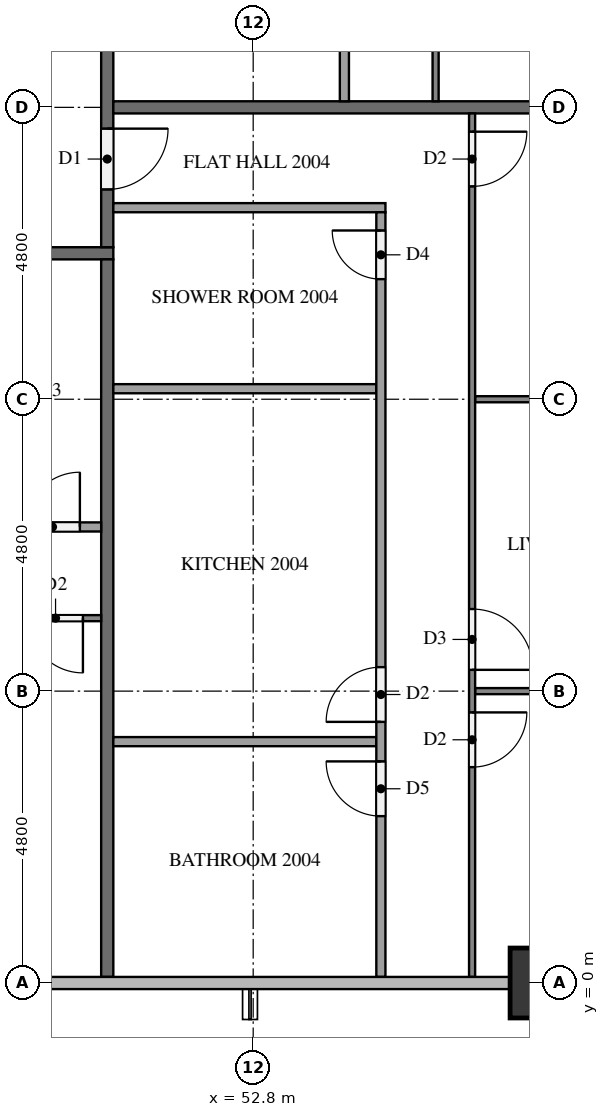
"""IFC4 building model, lengths in metres.
Left out: names, types, materials, properties, quantities, classifications, styles, units other than length and angle.
Written with IfcOpenShell. Run it as: python <this file> out.ifc"""

import sys

from ifc_helpers import new_model, si_unit, direction, frame, frame_2d, origin, origin_2d, place, context, subcontext, project, spatial, rectangle, extrude, element, fill, save


model = new_model("IFC4")
c1 = context("Model", 3, precision=1e-05, world=origin(), true_north=direction((0.0, 1.0)))
c2 = subcontext(c1, "Body", "Model", "MODEL_VIEW")
j1 = project(units=[si_unit("LENGTHUNIT", "METRE"), si_unit("PLANEANGLEUNIT", "RADIAN")], contexts=[c1])
p1 = place(None, origin())
s1 = spatial("IfcSite", under=j1, at=p1, CompositionType="ELEMENT")
p2 = place(p1, origin())
s2 = spatial("IfcBuilding", under=s1, at=p2, CompositionType="ELEMENT")
p3 = place(p2, frame((0.0, 0.0, 80.3)))
s3 = spatial("IfcBuildingStorey", under=s2, at=p3, CompositionType="ELEMENT", Elevation=80.3)
p4 = place(p3, frame((57.6, 0.0, 0.0), z_axis=(0.0, 0.0, 1.0), x_axis=(1.0, 0.0, 0.0)))
e1 = element("IfcColumn", 1, at=p4, inside=s3, PredefinedType="COLUMN", context=c2, shape_type="SweptSolid", body=[
    extrude(rectangle(XDim=1.15, YDim=1.15, at=origin_2d()), origin(), (0.0, 0.0, 1.0), 3.1),
])
p5 = place(p3, frame((50.5, 12.0, 0.0), z_axis=(0.0, 0.0, 1.0), x_axis=(-1.0, 0.0, 0.0)))
e2 = element("IfcWall", 2, at=p5, inside=s3, PredefinedType="PARTITIONING", context=c2, shape_type="SweptSolid", body=[
    extrude(rectangle(XDim=38.6, YDim=0.2, at=frame_2d((19.3, 0.0))), origin(), (0.0, 0.0, 1.0), 3.1),
])
p6 = place(p5, frame((31.65, 0.0, 0.0)))
e3 = element("IfcOpeningElement", 3, at=p6, cuts=e2, PredefinedType="OPENING", context=c2, shape_type="SweptSolid", body=[
    extrude(rectangle(XDim=1.0, YDim=2.1, at=frame_2d((0.5, 1.05))), frame((0.0, 0.11, 0.0), z_axis=(0.0, -1.0, 0.0), x_axis=(1.0, 0.0, 0.0)), (0.0, 0.0, 1.0), 0.22),
])
p7 = place(p5, frame((14.85, 0.0, 0.0)))
e4 = element("IfcOpeningElement", 4, at=p7, cuts=e2, PredefinedType="OPENING", context=c2, shape_type="SweptSolid", body=[
    extrude(rectangle(XDim=1.0, YDim=2.1, at=frame_2d((0.5, 1.05))), frame((0.0, 0.11, 0.0), z_axis=(0.0, -1.0, 0.0), x_axis=(1.0, 0.0, 0.0)), (0.0, 0.0, 1.0), 0.22),
])
p8 = place(p5, frame((13.15, 0.0, 0.0)))
e5 = element("IfcOpeningElement", 5, at=p8, cuts=e2, PredefinedType="OPENING", context=c2, shape_type="SweptSolid", body=[
    extrude(rectangle(XDim=1.0, YDim=2.1, at=frame_2d((0.5, 1.05))), frame((0.0, 0.11, 0.0), z_axis=(0.0, -1.0, 0.0), x_axis=(1.0, 0.0, 0.0)), (0.0, 0.0, 1.0), 0.22),
])
p9 = place(p3, frame((50.4, 40.7, 0.0), z_axis=(0.0, 0.0, 1.0), x_axis=(0.0, -1.0, 0.0)))
e6 = element("IfcWall", 6, at=p9, inside=s3, PredefinedType="PARTITIONING", context=c2, shape_type="SweptSolid", body=[
    extrude(rectangle(XDim=28.6, YDim=0.2, at=frame_2d((14.3, 0.0))), origin(), (0.0, 0.0, 1.0), 3.1),
])
p10 = place(p9, frame((26.65, 0.0, 0.0)))
e7 = element("IfcOpeningElement", 7, at=p10, cuts=e6, PredefinedType="OPENING", context=c2, shape_type="SweptSolid", body=[
    extrude(rectangle(XDim=1.0, YDim=2.1, at=frame_2d((0.5, 1.05))), frame((0.0, 0.11, 0.0), z_axis=(0.0, -1.0, 0.0), x_axis=(1.0, 0.0, 0.0)), (0.0, 0.0, 1.0), 0.22),
])
p11 = place(p9, frame((9.85, 0.0, 0.0)))
e8 = element("IfcOpeningElement", 8, at=p11, cuts=e6, PredefinedType="OPENING", context=c2, shape_type="SweptSolid", body=[
    extrude(rectangle(XDim=1.0, YDim=2.1, at=frame_2d((0.5, 1.05))), frame((0.0, 0.11, 0.0), z_axis=(0.0, -1.0, 0.0), x_axis=(1.0, 0.0, 0.0)), (0.0, 0.0, 1.0), 0.22),
])
p12 = place(p9, frame((2.65, 0.0, 0.0)))
e9 = element("IfcOpeningElement", 9, at=p12, cuts=e6, PredefinedType="OPENING", context=c2, shape_type="SweptSolid", body=[
    extrude(rectangle(XDim=1.0, YDim=2.1, at=frame_2d((0.5, 1.05))), frame((0.0, 0.11, 0.0), z_axis=(0.0, -1.0, 0.0), x_axis=(1.0, 0.0, 0.0)), (0.0, 0.0, 1.0), 0.22),
])
p13 = place(p9, frame((0.95, 0.0, 0.0)))
e10 = element("IfcOpeningElement", 10, at=p13, cuts=e6, PredefinedType="OPENING", context=c2, shape_type="SweptSolid", body=[
    extrude(rectangle(XDim=1.0, YDim=2.1, at=frame_2d((0.5, 1.05))), frame((0.0, 0.11, 0.0), z_axis=(0.0, -1.0, 0.0), x_axis=(1.0, 0.0, 0.0)), (0.0, 0.0, 1.0), 0.22),
])
p14 = place(p3, frame((50.4, 11.9, 0.0), z_axis=(0.0, 0.0, 1.0), x_axis=(0.0, -1.0, 0.0)))
e11 = element("IfcWall", 11, at=p14, inside=s3, PredefinedType="PARTITIONING", context=c2, shape_type="SweptSolid", body=[
    extrude(rectangle(XDim=11.8, YDim=0.2, at=frame_2d((5.9, 0.0))), origin(), (0.0, 0.0, 1.0), 3.1),
])
p15 = place(p3, frame((50.5, 14.4, 0.0), z_axis=(0.0, 0.0, 1.0), x_axis=(1.0, 0.0, 0.0)))
e12 = element("IfcWall", 12, at=p15, inside=s3, PredefinedType="PARTITIONING", context=c2, shape_type="SweptSolid", body=[
    extrude(rectangle(XDim=11.475, YDim=0.2, at=frame_2d((5.738, 0.0))), origin(), (0.0, 0.0, 1.0), 3.1),
])
p16 = place(p3, frame((50.3, 6.0, 0.0), z_axis=(0.0, 0.0, 1.0), x_axis=(-1.0, 0.0, 0.0)))
e13 = element("IfcWall", 13, at=p16, inside=s3, PredefinedType="PARTITIONING", context=c2, shape_type="SweptSolid", body=[
    extrude(rectangle(XDim=14.2, YDim=0.1, at=frame_2d((7.1, 0.0))), origin(), (0.0, 0.0, 1.0), 3.1),
])
p17 = place(p16, frame((9.85, 0.0, 0.0)))
e14 = element("IfcOpeningElement", 14, at=p17, cuts=e13, PredefinedType="OPENING", context=c2, shape_type="SweptSolid", body=[
    extrude(rectangle(XDim=1.0, YDim=2.1, at=frame_2d((0.5, 1.05))), frame((0.0, 0.06, 0.0), z_axis=(0.0, -1.0, 0.0), x_axis=(1.0, 0.0, 0.0)), (0.0, 0.0, 1.0), 0.12),
])
p18 = place(p16, frame((8.25, 0.0, 0.0)))
e15 = element("IfcOpeningElement", 15, at=p18, cuts=e13, PredefinedType="OPENING", context=c2, shape_type="SweptSolid", body=[
    extrude(rectangle(XDim=0.9, YDim=2.1, at=frame_2d((0.45, 1.05))), frame((0.0, 0.06, 0.0), z_axis=(0.0, -1.0, 0.0), x_axis=(1.0, 0.0, 0.0)), (0.0, 0.0, 1.0), 0.12),
])
p19 = place(p16, frame((0.3, 0.0, 0.0)))
e16 = element("IfcOpeningElement", 16, at=p19, cuts=e13, PredefinedType="OPENING", context=c2, shape_type="SweptSolid", body=[
    extrude(rectangle(XDim=0.9, YDim=2.1, at=frame_2d((0.45, 1.05))), frame((0.0, 0.06, 0.0), z_axis=(0.0, -1.0, 0.0), x_axis=(1.0, 0.0, 0.0)), (0.0, 0.0, 1.0), 0.12),
])
p20 = place(p3, frame((37.725, 7.5, 0.0), z_axis=(0.0, 0.0, 1.0), x_axis=(1.0, 0.0, 0.0)))
e17 = element("IfcWall", 17, at=p20, inside=s3, PredefinedType="PARTITIONING", context=c2, shape_type="SweptSolid", body=[
    extrude(rectangle(XDim=12.575, YDim=0.15, at=frame_2d((6.288, 0.0))), origin(), (0.0, 0.0, 1.0), 3.1),
])
p21 = place(p20, frame((1.777, 0.0, 0.0)))
e18 = element("IfcOpeningElement", 18, at=p21, cuts=e17, PredefinedType="OPENING", context=c2, shape_type="SweptSolid", body=[
    extrude(rectangle(XDim=0.8, YDim=2.1, at=frame_2d((0.4, 1.05))), frame((0.0, 0.085, 0.0), z_axis=(0.0, -1.0, 0.0), x_axis=(1.0, 0.0, 0.0)), (0.0, 0.0, 1.0), 0.17),
])
p22 = place(p20, frame((3.227, 0.0, 0.0)))
e19 = element("IfcOpeningElement", 19, at=p22, cuts=e17, PredefinedType="OPENING", context=c2, shape_type="SweptSolid", body=[
    extrude(rectangle(XDim=0.9, YDim=2.1, at=frame_2d((0.45, 1.05))), frame((0.0, 0.085, 0.0), z_axis=(0.0, -1.0, 0.0), x_axis=(1.0, 0.0, 0.0)), (0.0, 0.0, 1.0), 0.17),
])
p23 = place(p20, frame((11.325, 0.0, 0.0)))
e20 = element("IfcOpeningElement", 20, at=p23, cuts=e17, PredefinedType="OPENING", context=c2, shape_type="SweptSolid", body=[
    extrude(rectangle(XDim=0.9, YDim=2.1, at=frame_2d((0.45, 1.05))), frame((0.0, 0.085, 0.0), z_axis=(0.0, -1.0, 0.0), x_axis=(1.0, 0.0, 0.0)), (0.0, 0.0, 1.0), 0.17),
])
p24 = place(p3, frame((56.45, 9.6, 0.0), z_axis=(0.0, 0.0, 1.0), x_axis=(1.0, 0.0, 0.0)))
e21 = element("IfcWall", 21, at=p24, inside=s3, PredefinedType="PARTITIONING", context=c2, shape_type="SweptSolid", body=[
    extrude(rectangle(XDim=5.85, YDim=0.1, at=frame_2d((2.925, 0.0))), origin(), (0.0, 0.0, 1.0), 3.1),
])
p25 = place(p3, frame((56.45, 4.8, 0.0), z_axis=(0.0, 0.0, 1.0), x_axis=(1.0, 0.0, 0.0)))
e22 = element("IfcWall", 22, at=p25, inside=s3, PredefinedType="PARTITIONING", context=c2, shape_type="SweptSolid", body=[
    extrude(rectangle(XDim=5.375, YDim=0.1, at=frame_2d((2.688, 0.0))), origin(), (0.0, 0.0, 1.0), 3.1),
])
p26 = place(p3, frame((56.4, 14.3, 0.0), z_axis=(0.0, 0.0, 1.0), x_axis=(0.0, -1.0, 0.0)))
e23 = element("IfcWall", 23, at=p26, inside=s3, PredefinedType="PARTITIONING", context=c2, shape_type="SweptSolid", body=[
    extrude(rectangle(XDim=14.2, YDim=0.1, at=frame_2d((7.1, 0.0))), origin(), (0.0, 0.0, 1.0), 3.1),
])
p27 = place(p26, frame((0.3, 0.0, 0.0)))
e24 = element("IfcOpeningElement", 24, at=p27, cuts=e23, PredefinedType="OPENING", context=c2, shape_type="SweptSolid", body=[
    extrude(rectangle(XDim=0.9, YDim=2.1, at=frame_2d((0.45, 1.05))), frame((0.0, 0.06, 0.0), z_axis=(0.0, -1.0, 0.0), x_axis=(1.0, 0.0, 0.0)), (0.0, 0.0, 1.0), 0.12),
])
p28 = place(p26, frame((8.15, 0.0, 0.0)))
e25 = element("IfcOpeningElement", 25, at=p28, cuts=e23, PredefinedType="OPENING", context=c2, shape_type="SweptSolid", body=[
    extrude(rectangle(XDim=1.0, YDim=2.1, at=frame_2d((0.5, 1.05))), frame((0.0, 0.06, 0.0), z_axis=(0.0, -1.0, 0.0), x_axis=(1.0, 0.0, 0.0)), (0.0, 0.0, 1.0), 0.12),
])
p29 = place(p26, frame((9.85, 0.0, 0.0)))
e26 = element("IfcOpeningElement", 26, at=p29, cuts=e23, PredefinedType="OPENING", context=c2, shape_type="SweptSolid", body=[
    extrude(rectangle(XDim=0.9, YDim=2.1, at=frame_2d((0.45, 1.05))), frame((0.0, 0.06, 0.0), z_axis=(0.0, -1.0, 0.0), x_axis=(1.0, 0.0, 0.0)), (0.0, 0.0, 1.0), 0.12),
])
for number, where, z_axis, x_axis in (
    (27, (50.5, 9.773, 0.0), (0.0, 0.0, 1.0), (1.0, 0.0, 0.0)),
    (28, (50.5, 3.969, 0.0), (0.0, 0.0, 1.0), (1.0, 0.0, 0.0)),
):
    element("IfcWall", number, at=place(p3, frame(where, z_axis=z_axis, x_axis=x_axis)), inside=s3, PredefinedType="PARTITIONING", context=c2, shape_type="SweptSolid", body=[
        extrude(rectangle(XDim=4.325, YDim=0.15, at=frame_2d((2.163, 0.0))), origin(), (0.0, 0.0, 1.0), 3.1),
    ])
p30 = place(p3, frame((50.5, 12.75, 0.0), z_axis=(0.0, 0.0, 1.0), x_axis=(1.0, 0.0, 0.0)))
e29 = element("IfcWall", 29, at=p30, inside=s3, PredefinedType="PARTITIONING", context=c2, shape_type="SweptSolid", body=[
    extrude(rectangle(XDim=4.475, YDim=0.15, at=frame_2d((2.238, 0.0))), origin(), (0.0, 0.0, 1.0), 3.1),
])
p31 = place(p3, frame((54.9, 0.1, 0.0), z_axis=(0.0, 0.0, 1.0), x_axis=(0.0, 1.0, 0.0)))
e30 = element("IfcWall", 30, at=p31, inside=s3, PredefinedType="PARTITIONING", context=c2, shape_type="SweptSolid", body=[
    extrude(rectangle(XDim=12.575, YDim=0.15, at=frame_2d((6.288, 0.0))), origin(), (0.0, 0.0, 1.0), 3.1),
])
p32 = place(p31, frame((11.475, 0.0, 0.0)))
e31 = element("IfcOpeningElement", 31, at=p32, cuts=e30, PredefinedType="OPENING", context=c2, shape_type="SweptSolid", body=[
    extrude(rectangle(XDim=0.8, YDim=2.1, at=frame_2d((0.4, 1.05))), frame((0.0, 0.085, 0.0), z_axis=(0.0, -1.0, 0.0), x_axis=(1.0, 0.0, 0.0)), (0.0, 0.0, 1.0), 0.17),
])
p33 = place(p31, frame((4.194, 0.0, 0.0)))
e32 = element("IfcOpeningElement", 32, at=p33, cuts=e30, PredefinedType="OPENING", context=c2, shape_type="SweptSolid", body=[
    extrude(rectangle(XDim=0.9, YDim=2.1, at=frame_2d((0.45, 1.05))), frame((0.0, 0.085, 0.0), z_axis=(0.0, -1.0, 0.0), x_axis=(1.0, 0.0, 0.0)), (0.0, 0.0, 1.0), 0.17),
])
p34 = place(p31, frame((2.644, 0.0, 0.0)))
e33 = element("IfcOpeningElement", 33, at=p34, cuts=e30, PredefinedType="OPENING", context=c2, shape_type="SweptSolid", body=[
    extrude(rectangle(XDim=0.9, YDim=2.1, at=frame_2d((0.45, 1.05))), frame((0.0, 0.085, 0.0), z_axis=(0.0, -1.0, 0.0), x_axis=(1.0, 0.0, 0.0)), (0.0, 0.0, 1.0), 0.17),
])
p35 = place(p3, frame((55.8, 31.1, 0.0), z_axis=(0.0, 0.0, 1.0), x_axis=(0.0, -1.0, 0.0)))
e34 = element("IfcWall", 34, at=p35, inside=s3, PredefinedType="PARTITIONING", context=c2, shape_type="SweptSolid", body=[
    extrude(rectangle(XDim=16.6, YDim=0.1, at=frame_2d((8.3, 0.0))), origin(), (0.0, 0.0, 1.0), 3.1),
])
p36 = place(p35, frame((0.3, 0.0, 0.0)))
e35 = element("IfcOpeningElement", 35, at=p36, cuts=e34, PredefinedType="OPENING", context=c2, shape_type="SweptSolid", body=[
    extrude(rectangle(XDim=0.9, YDim=2.1, at=frame_2d((0.45, 1.05))), frame((0.0, 0.06, 0.0), z_axis=(0.0, -1.0, 0.0), x_axis=(1.0, 0.0, 0.0)), (0.0, 0.0, 1.0), 0.12),
])
p37 = place(p35, frame((10.55, 0.0, 0.0)))
e36 = element("IfcOpeningElement", 36, at=p37, cuts=e34, PredefinedType="OPENING", context=c2, shape_type="SweptSolid", body=[
    extrude(rectangle(XDim=1.0, YDim=2.1, at=frame_2d((0.5, 1.05))), frame((0.0, 0.06, 0.0), z_axis=(0.0, -1.0, 0.0), x_axis=(1.0, 0.0, 0.0)), (0.0, 0.0, 1.0), 0.12),
])
p38 = place(p35, frame((12.25, 0.0, 0.0)))
e37 = element("IfcOpeningElement", 37, at=p38, cuts=e34, PredefinedType="OPENING", context=c2, shape_type="SweptSolid", body=[
    extrude(rectangle(XDim=0.9, YDim=2.1, at=frame_2d((0.45, 1.05))), frame((0.0, 0.06, 0.0), z_axis=(0.0, -1.0, 0.0), x_axis=(1.0, 0.0, 0.0)), (0.0, 0.0, 1.0), 0.12),
])
p39 = place(p3, frame((54.3, 14.5, 0.0), z_axis=(0.0, 0.0, 1.0), x_axis=(0.0, 1.0, 0.0)))
e38 = element("IfcWall", 38, at=p39, inside=s3, PredefinedType="PARTITIONING", context=c2, shape_type="SweptSolid", body=[
    extrude(rectangle(XDim=14.975, YDim=0.15, at=frame_2d((7.488, 0.0))), origin(), (0.0, 0.0, 1.0), 3.1),
])
p40 = place(p39, frame((13.775, 0.0, 0.0)))
e39 = element("IfcOpeningElement", 39, at=p40, cuts=e38, PredefinedType="OPENING", context=c2, shape_type="SweptSolid", body=[
    extrude(rectangle(XDim=0.9, YDim=2.1, at=frame_2d((0.45, 1.05))), frame((0.0, 0.085, 0.0), z_axis=(0.0, -1.0, 0.0), x_axis=(1.0, 0.0, 0.0)), (0.0, 0.0, 1.0), 0.17),
])
p41 = place(p39, frame((7.237, 0.0, 0.0)))
e40 = element("IfcOpeningElement", 40, at=p41, cuts=e38, PredefinedType="OPENING", context=c2, shape_type="SweptSolid", body=[
    extrude(rectangle(XDim=0.8, YDim=2.1, at=frame_2d((0.4, 1.05))), frame((0.0, 0.085, 0.0), z_axis=(0.0, -1.0, 0.0), x_axis=(1.0, 0.0, 0.0)), (0.0, 0.0, 1.0), 0.17),
])
p42 = place(p39, frame((5.687, 0.0, 0.0)))
e41 = element("IfcOpeningElement", 41, at=p42, cuts=e38, PredefinedType="OPENING", context=c2, shape_type="SweptSolid", body=[
    extrude(rectangle(XDim=0.9, YDim=2.1, at=frame_2d((0.45, 1.05))), frame((0.0, 0.085, 0.0), z_axis=(0.0, -1.0, 0.0), x_axis=(1.0, 0.0, 0.0)), (0.0, 0.0, 1.0), 0.17),
])
p43 = place(p10, origin())
e42 = element("IfcDoor", 42, at=p43, inside=s3, OperationType="SINGLE_SWING_LEFT", PredefinedType="DOOR", context=c2, shape_type="SweptSolid", body=[
    extrude(rectangle(XDim=1.0, YDim=2.1, at=frame_2d((0.5, 1.05))), frame((0.0, 0.025, 0.0), z_axis=(0.0, -1.0, 0.0), x_axis=(1.0, 0.0, 0.0)), (0.0, 0.0, 1.0), 0.05),
])
fill(e7, e42)
p44 = place(p19, origin())
e43 = element("IfcDoor", 43, at=p44, inside=s3, OperationType="SINGLE_SWING_LEFT", PredefinedType="DOOR", context=c2, shape_type="SweptSolid", body=[
    extrude(rectangle(XDim=0.9, YDim=2.1, at=frame_2d((0.45, 1.05))), frame((0.0, 0.025, 0.0), z_axis=(0.0, -1.0, 0.0), x_axis=(1.0, 0.0, 0.0)), (0.0, 0.0, 1.0), 0.05),
])
fill(e16, e43)
p45 = place(p23, origin())
e44 = element("IfcDoor", 44, at=p45, inside=s3, OperationType="SINGLE_SWING_RIGHT", PredefinedType="DOOR", context=c2, shape_type="SweptSolid", body=[
    extrude(rectangle(XDim=0.9, YDim=2.1, at=frame_2d((0.45, 1.05))), frame((0.0, 0.025, 0.0), z_axis=(0.0, -1.0, 0.0), x_axis=(1.0, 0.0, 0.0)), (0.0, 0.0, 1.0), 0.05),
])
fill(e20, e44)
p46 = place(p27, origin())
e45 = element("IfcDoor", 45, at=p46, inside=s3, OperationType="SINGLE_SWING_LEFT", PredefinedType="DOOR", context=c2, shape_type="SweptSolid", body=[
    extrude(rectangle(XDim=0.9, YDim=2.1, at=frame_2d((0.45, 1.05))), frame((0.0, 0.025, 0.0), z_axis=(0.0, -1.0, 0.0), x_axis=(1.0, 0.0, 0.0)), (0.0, 0.0, 1.0), 0.05),
])
fill(e24, e45)
p47 = place(p28, origin())
e46 = element("IfcDoor", 46, at=p47, inside=s3, OperationType="SINGLE_SWING_RIGHT", PredefinedType="DOOR", context=c2, shape_type="SweptSolid", body=[
    extrude(rectangle(XDim=1.0, YDim=2.1, at=frame_2d((0.5, 1.05))), frame((0.0, 0.025, 0.0), z_axis=(0.0, -1.0, 0.0), x_axis=(1.0, 0.0, 0.0)), (0.0, 0.0, 1.0), 0.05),
])
fill(e25, e46)
p48 = place(p29, origin())
e47 = element("IfcDoor", 47, at=p48, inside=s3, OperationType="SINGLE_SWING_LEFT", PredefinedType="DOOR", context=c2, shape_type="SweptSolid", body=[
    extrude(rectangle(XDim=0.9, YDim=2.1, at=frame_2d((0.45, 1.05))), frame((0.0, 0.025, 0.0), z_axis=(0.0, -1.0, 0.0), x_axis=(1.0, 0.0, 0.0)), (0.0, 0.0, 1.0), 0.05),
])
fill(e26, e47)
p49 = place(p32, origin())
e48 = element("IfcDoor", 48, at=p49, inside=s3, OperationType="SINGLE_SWING_RIGHT", PredefinedType="DOOR", context=c2, shape_type="SweptSolid", body=[
    extrude(rectangle(XDim=0.8, YDim=2.1, at=frame_2d((0.4, 1.05))), frame((0.0, 0.025, 0.0), z_axis=(0.0, -1.0, 0.0), x_axis=(1.0, 0.0, 0.0)), (0.0, 0.0, 1.0), 0.05),
])
fill(e31, e48)
p50 = place(p33, origin())
e49 = element("IfcDoor", 49, at=p50, inside=s3, OperationType="SINGLE_SWING_LEFT", PredefinedType="DOOR", context=c2, shape_type="SweptSolid", body=[
    extrude(rectangle(XDim=0.9, YDim=2.1, at=frame_2d((0.45, 1.05))), frame((0.0, 0.025, 0.0), z_axis=(0.0, -1.0, 0.0), x_axis=(1.0, 0.0, 0.0)), (0.0, 0.0, 1.0), 0.05),
])
fill(e32, e49)
p51 = place(p34, origin())
e50 = element("IfcDoor", 50, at=p51, inside=s3, OperationType="SINGLE_SWING_RIGHT", PredefinedType="DOOR", context=c2, shape_type="SweptSolid", body=[
    extrude(rectangle(XDim=0.9, YDim=2.1, at=frame_2d((0.45, 1.05))), frame((0.0, 0.025, 0.0), z_axis=(0.0, -1.0, 0.0), x_axis=(1.0, 0.0, 0.0)), (0.0, 0.0, 1.0), 0.05),
])
fill(e33, e50)
save(model, sys.argv[1])
